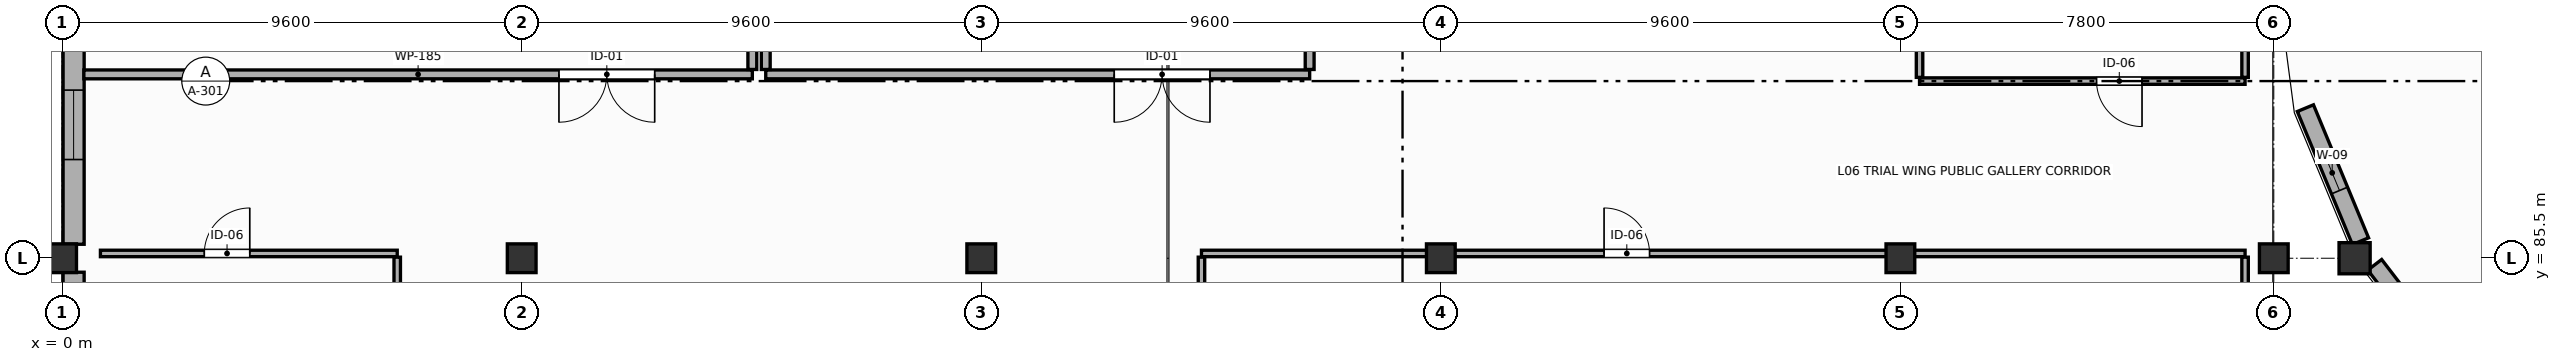
"""IFC4 building model, lengths in metres.
Left out: names, types, materials, properties, quantities, classifications, styles, units other than length and angle.
Written with IfcOpenShell. Run it as: python <this file> out.ifc"""

import sys

from ifc_helpers import new_model, si_unit, direction, frame, frame_2d, origin, origin_2d, place, context, subcontext, project, spatial, rectangle, circle, extrude, element, fill, save


model = new_model("IFC4")
c1 = context("Model", 3, precision=1e-05, world=origin(), true_north=direction((0.0, 1.0)))
c2 = subcontext(c1, "Body", "Model", "MODEL_VIEW")
j1 = project(units=[si_unit("LENGTHUNIT", "METRE"), si_unit("PLANEANGLEUNIT", "RADIAN")], contexts=[c1])
p1 = place(None, origin())
s1 = spatial("IfcSite", under=j1, at=p1, CompositionType="ELEMENT")
p2 = place(p1, origin())
s2 = spatial("IfcBuilding", under=s1, at=p2, CompositionType="ELEMENT")
p3 = place(p2, frame((0.0, 0.0, 22.8)))
s3 = spatial("IfcBuildingStorey", under=s2, at=p3, CompositionType="ELEMENT", Elevation=22.8)
p4 = place(p3, frame((47.888, 85.5, 0.0), z_axis=(0.0, 0.0, 1.0), x_axis=(1.0, 0.0, 0.0)))
e1 = element("IfcColumn", 1, at=p4, inside=s3, PredefinedType="COLUMN", context=c2, shape_type="SweptSolid", body=[
    extrude(circle(Radius=0.325, at=origin_2d()), origin(), (0.0, 0.0, 1.0), 4.2),
])
for number, where, z_axis, x_axis in (
    (2, (0.0, 85.5, 0.0), (0.0, 0.0, 1.0), (1.0, 0.0, 0.0)),
    (3, (9.6, 85.5, 0.0), (0.0, 0.0, 1.0), (1.0, 0.0, 0.0)),
    (4, (19.2, 85.5, 0.0), (0.0, 0.0, 1.0), (1.0, 0.0, 0.0)),
    (5, (28.8, 85.5, 0.0), (0.0, 0.0, 1.0), (1.0, 0.0, 0.0)),
    (6, (38.4, 85.5, 0.0), (0.0, 0.0, 1.0), (1.0, 0.0, 0.0)),
    (7, (46.2, 85.5, 0.0), (0.0, 0.0, 1.0), (1.0, 0.0, 0.0)),
):
    element("IfcColumn", number, at=place(p3, frame(where, z_axis=z_axis, x_axis=x_axis)), inside=s3, PredefinedType="COLUMN", context=c2, shape_type="SweptSolid", body=[
        extrude(rectangle(XDim=0.6, YDim=0.6, at=origin_2d()), origin(), (0.0, 0.0, 1.0), 4.2),
    ])
p5 = place(p3, frame((46.86, 88.635, 0.0), z_axis=(0.0, 0.0, 1.0), x_axis=(0.382700732442, -0.923872366395, 0.0)))
e8 = element("IfcWall", 8, at=p5, inside=s3, PredefinedType="ELEMENTEDWALL", context=c2, shape_type="SweptSolid", body=[
    extrude(rectangle(XDim=3.007, YDim=0.365, at=frame_2d((1.504, 0.0))), origin(), (0.0, 0.0, 1.0), 3.1),
])
p6 = place(p5, frame((1.062, 0.0, 0.85)))
e9 = element("IfcOpeningElement", 9, at=p6, cuts=e8, PredefinedType="OPENING", context=c2, shape_type="SweptSolid", body=[
    extrude(rectangle(XDim=0.8, YDim=1.7, at=frame_2d((0.4, 0.85))), frame((0.0, 0.192, 0.0), z_axis=(0.0, -1.0, 0.0), x_axis=(1.0, 0.0, 0.0)), (0.0, 0.0, 1.0), 0.385),
])
p7 = place(p3, frame((48.309, 85.363, 0.0), z_axis=(0.0, 0.0, 1.0), x_axis=(0.60876624393, -0.793349645649, 0.0)))
e10 = element("IfcWall", 10, at=p7, inside=s3, PredefinedType="ELEMENTEDWALL", context=c2, shape_type="SweptSolid", body=[
    extrude(rectangle(XDim=2.924, YDim=0.365, at=frame_2d((1.462, 0.0))), origin(), (0.0, 0.0, 1.0), 3.1),
])
p8 = place(p7, frame((1.062, 0.0, 0.85)))
e11 = element("IfcOpeningElement", 11, at=p8, cuts=e10, PredefinedType="OPENING", context=c2, shape_type="SweptSolid", body=[
    extrude(rectangle(XDim=0.8, YDim=1.7, at=frame_2d((0.4, 0.85))), frame((0.0, 0.192, 0.0), z_axis=(0.0, -1.0, 0.0), x_axis=(1.0, 0.0, 0.0)), (0.0, 0.0, 1.0), 0.385),
])
p9 = place(p3, frame((0.24, 74.692, 0.0), z_axis=(0.0, 0.0, 1.0), x_axis=(0.0, 1.0, 0.0)))
e12 = element("IfcWall", 12, at=p9, inside=s3, PredefinedType="STANDARD", context=c2, shape_type="SweptSolid", body=[
    extrude(rectangle(XDim=10.516, YDim=0.44, at=frame_2d((5.258, 0.0))), origin(), (0.0, 0.0, 1.0), 3.1),
])
p10 = place(p9, frame((1.52, 0.0, 0.85)))
e13 = element("IfcOpeningElement", 13, at=p10, cuts=e12, PredefinedType="OPENING", context=c2, shape_type="SweptSolid", body=[
    extrude(rectangle(XDim=1.45, YDim=2.05, at=frame_2d((0.725, 1.025))), frame((0.0, 0.23, 0.0), z_axis=(0.0, -1.0, 0.0), x_axis=(1.0, 0.0, 0.0)), (0.0, 0.0, 1.0), 0.46),
])
p11 = place(p9, frame((4.533, 0.0, 0.85)))
e14 = element("IfcOpeningElement", 14, at=p11, cuts=e12, PredefinedType="OPENING", context=c2, shape_type="SweptSolid", body=[
    extrude(rectangle(XDim=1.45, YDim=2.05, at=frame_2d((0.725, 1.025))), frame((0.0, 0.23, 0.0), z_axis=(0.0, -1.0, 0.0), x_axis=(1.0, 0.0, 0.0)), (0.0, 0.0, 1.0), 0.46),
])
p12 = place(p9, frame((7.546, 0.0, 0.85)))
e15 = element("IfcOpeningElement", 15, at=p12, cuts=e12, PredefinedType="OPENING", context=c2, shape_type="SweptSolid", body=[
    extrude(rectangle(XDim=1.45, YDim=2.05, at=frame_2d((0.725, 1.025))), frame((0.0, 0.23, 0.0), z_axis=(0.0, -1.0, 0.0), x_axis=(1.0, 0.0, 0.0)), (0.0, 0.0, 1.0), 0.46),
])
p13 = place(p3, frame((0.24, 85.792, 0.0), z_axis=(0.0, 0.0, 1.0), x_axis=(0.0, 1.0, 0.0)))
e16 = element("IfcWall", 16, at=p13, inside=s3, PredefinedType="STANDARD", context=c2, shape_type="SweptSolid", body=[
    extrude(rectangle(XDim=12.016, YDim=0.44, at=frame_2d((6.008, 0.0))), origin(), (0.0, 0.0, 1.0), 3.05),
])
p14 = place(p13, frame((1.77, 0.0, 0.78)))
e17 = element("IfcOpeningElement", 17, at=p14, cuts=e16, PredefinedType="OPENING", context=c2, shape_type="SweptSolid", body=[
    extrude(rectangle(XDim=1.45, YDim=2.05, at=frame_2d((0.725, 1.025))), frame((0.0, 0.23, 0.0), z_axis=(0.0, -1.0, 0.0), x_axis=(1.0, 0.0, 0.0)), (0.0, 0.0, 1.0), 0.46),
])
p15 = place(p13, frame((5.283, 0.0, 0.78)))
e18 = element("IfcOpeningElement", 18, at=p15, cuts=e16, PredefinedType="OPENING", context=c2, shape_type="SweptSolid", body=[
    extrude(rectangle(XDim=1.45, YDim=2.05, at=frame_2d((0.725, 1.025))), frame((0.0, 0.23, 0.0), z_axis=(0.0, -1.0, 0.0), x_axis=(1.0, 0.0, 0.0)), (0.0, 0.0, 1.0), 0.46),
])
p16 = place(p13, frame((8.796, 0.0, 0.78)))
e19 = element("IfcOpeningElement", 19, at=p16, cuts=e16, PredefinedType="OPENING", context=c2, shape_type="SweptSolid", body=[
    extrude(rectangle(XDim=1.45, YDim=2.05, at=frame_2d((0.725, 1.025))), frame((0.0, 0.23, 0.0), z_axis=(0.0, -1.0, 0.0), x_axis=(1.0, 0.0, 0.0)), (0.0, 0.0, 1.0), 0.46),
])
p17 = place(p3, frame((14.418, 89.34, 0.0), z_axis=(0.0, 0.0, 1.0), x_axis=(-1.0, 0.0, 0.0)))
e20 = element("IfcWall", 20, at=p17, inside=s3, PredefinedType="PARTITIONING", context=c2, shape_type="SweptSolid", body=[
    extrude(rectangle(XDim=13.964, YDim=0.185, at=frame_2d((6.982, 0.0))), origin(), (0.0, 0.0, 1.0), 3.1),
])
p18 = place(p17, frame((2.04, 0.0, 0.0)))
e21 = element("IfcOpeningElement", 21, at=p18, cuts=e20, PredefinedType="OPENING", context=c2, shape_type="SweptSolid", body=[
    extrude(rectangle(XDim=2.0, YDim=2.5, at=frame_2d((1.0, 1.25))), frame((0.0, 0.103, 0.0), z_axis=(0.0, -1.0, 0.0), x_axis=(1.0, 0.0, 0.0)), (0.0, 0.0, 1.0), 0.205),
])
p19 = place(p3, frame((14.418, 112.346, 0.0), z_axis=(0.0, 0.0, 1.0), x_axis=(0.0, -1.0, 0.0)))
e22 = element("IfcWall", 22, at=p19, inside=s3, PredefinedType="PARTITIONING", context=c2, shape_type="SweptSolid", body=[
    extrude(rectangle(XDim=22.904, YDim=0.185, at=frame_2d((11.452, 0.0))), origin(), (0.0, 0.0, 1.0), 3.3),
])
p20 = place(p3, frame((26.06, 89.34, 0.0), z_axis=(0.0, 0.0, 1.0), x_axis=(-1.0, 0.0, 0.0)))
e23 = element("IfcWall", 23, at=p20, inside=s3, PredefinedType="PARTITIONING", context=c2, shape_type="SweptSolid", body=[
    extrude(rectangle(XDim=11.362, YDim=0.185, at=frame_2d((5.681, 0.0))), origin(), (0.0, 0.0, 1.0), 3.1),
])
p21 = place(p20, frame((2.083, 0.0, 0.0)))
e24 = element("IfcOpeningElement", 24, at=p21, cuts=e23, PredefinedType="OPENING", context=c2, shape_type="SweptSolid", body=[
    extrude(rectangle(XDim=2.0, YDim=2.5, at=frame_2d((1.0, 1.25))), frame((0.0, 0.103, 0.0), z_axis=(0.0, -1.0, 0.0), x_axis=(1.0, 0.0, 0.0)), (0.0, 0.0, 1.0), 0.205),
])
for number, where, z_axis, x_axis in (
    (25, (14.698, 89.442, 0.0), (0.0, 0.0, 1.0), (0.0, 1.0, 0.0)),
    (26, (26.06, 97.597, 0.0), (0.0, 0.0, 1.0), (0.0, -1.0, 0.0)),
):
    element("IfcWall", number, at=place(p3, frame(where, z_axis=z_axis, x_axis=x_axis)), inside=s3, PredefinedType="PARTITIONING", context=c2, shape_type="SweptSolid", body=[
        extrude(rectangle(XDim=8.155, YDim=0.185, at=frame_2d((4.078, 0.0))), origin(), (0.0, 0.0, 1.0), 3.35),
    ])
p22 = place(p3, frame((45.6, 89.2, 0.0), z_axis=(0.0, 0.0, 1.0), x_axis=(-1.0, 0.0, 0.0)))
e27 = element("IfcWall", 27, at=p22, inside=s3, PredefinedType="PARTITIONING", context=c2, shape_type="SweptSolid", body=[
    extrude(rectangle(XDim=6.8, YDim=0.135, at=frame_2d((3.4, 0.0))), origin(), (0.0, 0.0, 1.0), 3.075),
])
p23 = place(p22, frame((2.153, 0.0, 0.0)))
e28 = element("IfcOpeningElement", 28, at=p23, cuts=e27, PredefinedType="OPENING", context=c2, shape_type="SweptSolid", body=[
    extrude(rectangle(XDim=0.95, YDim=2.15, at=frame_2d((0.475, 1.075))), frame((0.0, 0.077, 0.0), z_axis=(0.0, -1.0, 0.0), x_axis=(1.0, 0.0, 0.0)), (0.0, 0.0, 1.0), 0.155),
])
p24 = place(p3, frame((38.8, 89.278, 0.0), z_axis=(0.0, 0.0, 1.0), x_axis=(0.0, 1.0, 0.0)))
e29 = element("IfcWall", 29, at=p24, inside=s3, PredefinedType="PARTITIONING", context=c2, shape_type="SweptSolid", body=[
    extrude(rectangle(XDim=12.645, YDim=0.135, at=frame_2d((6.323, 0.0))), origin(), (0.0, 0.0, 1.0), 3.05),
])
p25 = place(p3, frame((45.6, 101.923, 0.0), z_axis=(0.0, 0.0, 1.0), x_axis=(0.0, -1.0, 0.0)))
e30 = element("IfcWall", 30, at=p25, inside=s3, PredefinedType="PARTITIONING", context=c2, shape_type="SweptSolid", body=[
    extrude(rectangle(XDim=12.645, YDim=0.135, at=frame_2d((6.323, 0.0))), origin(), (0.0, 0.0, 1.0), 3.325),
])
p26 = place(p3, frame((0.8, 85.6, 0.0), z_axis=(0.0, 0.0, 1.0), x_axis=(1.0, 0.0, 0.0)))
e31 = element("IfcWall", 31, at=p26, inside=s3, PredefinedType="PARTITIONING", context=c2, shape_type="SweptSolid", body=[
    extrude(rectangle(XDim=6.2, YDim=0.135, at=frame_2d((3.1, 0.0))), origin(), (0.0, 0.0, 1.0), 3.3),
])
p27 = place(p26, frame((2.17, 0.0, 0.0)))
e32 = element("IfcOpeningElement", 32, at=p27, cuts=e31, PredefinedType="OPENING", context=c2, shape_type="SweptSolid", body=[
    extrude(rectangle(XDim=0.95, YDim=2.15, at=frame_2d((0.475, 1.075))), frame((0.0, 0.077, 0.0), z_axis=(0.0, -1.0, 0.0), x_axis=(1.0, 0.0, 0.0)), (0.0, 0.0, 1.0), 0.155),
])
p28 = place(p3, frame((7.0, 85.522, 0.0), z_axis=(0.0, 0.0, 1.0), x_axis=(0.0, -1.0, 0.0)))
e33 = element("IfcWall", 33, at=p28, inside=s3, PredefinedType="PARTITIONING", context=c2, shape_type="SweptSolid", body=[
    extrude(rectangle(XDim=13.083, YDim=0.135, at=frame_2d((6.542, 0.0))), origin(), (0.0, 0.0, 1.0), 3.3),
])
p29 = place(p3, frame((23.8, 85.6, 0.0), z_axis=(0.0, 0.0, 1.0), x_axis=(1.0, 0.0, 0.0)))
e34 = element("IfcWall", 34, at=p29, inside=s3, PredefinedType="PARTITIONING", context=c2, shape_type="SweptSolid", body=[
    extrude(rectangle(XDim=21.8, YDim=0.135, at=frame_2d((10.9, 0.0))), origin(), (0.0, 0.0, 1.0), 3.075),
])
p30 = place(p29, frame((8.41, 0.0, 0.0)))
e35 = element("IfcOpeningElement", 35, at=p30, cuts=e34, PredefinedType="OPENING", context=c2, shape_type="SweptSolid", body=[
    extrude(rectangle(XDim=0.95, YDim=2.15, at=frame_2d((0.475, 1.075))), frame((0.0, 0.077, 0.0), z_axis=(0.0, -1.0, 0.0), x_axis=(1.0, 0.0, 0.0)), (0.0, 0.0, 1.0), 0.155),
])
p31 = place(p3, frame((23.8, 72.31, 0.0), z_axis=(0.0, 0.0, 1.0), x_axis=(0.0, 1.0, 0.0)))
e36 = element("IfcWall", 36, at=p31, inside=s3, PredefinedType="PARTITIONING", context=c2, shape_type="SweptSolid", body=[
    extrude(rectangle(XDim=13.212, YDim=0.135, at=frame_2d((6.606, 0.0))), origin(), (0.0, 0.0, 1.0), 3.3),
])
p32 = place(p3, frame((45.6, 85.522, 0.0), z_axis=(0.0, 0.0, 1.0), x_axis=(0.0, -1.0, 0.0)))
e37 = element("IfcWall", 37, at=p32, inside=s3, PredefinedType="PARTITIONING", context=c2, shape_type="SweptSolid", body=[
    extrude(rectangle(XDim=13.083, YDim=0.135, at=frame_2d((6.542, 0.0))), origin(), (0.0, 0.0, 1.0), 3.375),
])
p33 = place(p6, origin())
e38 = element("IfcWindow", 38, at=p33, inside=s3, PartitioningType="SINGLE_PANEL", PredefinedType="WINDOW", context=c2, shape_type="SweptSolid", body=[
    extrude(rectangle(XDim=0.8, YDim=1.7, at=frame_2d((0.4, 0.85))), frame((0.0, 0.03, 0.0), z_axis=(0.0, -1.0, 0.0), x_axis=(1.0, 0.0, 0.0)), (0.0, 0.0, 1.0), 0.06),
])
fill(e9, e38)
p34 = place(p14, origin())
e39 = element("IfcWindow", 39, at=p34, inside=s3, PartitioningType="SINGLE_PANEL", PredefinedType="WINDOW", context=c2, shape_type="SweptSolid", body=[
    extrude(rectangle(XDim=1.45, YDim=2.05, at=frame_2d((0.725, 1.025))), frame((0.0, 0.03, 0.0), z_axis=(0.0, -1.0, 0.0), x_axis=(1.0, 0.0, 0.0)), (0.0, 0.0, 1.0), 0.06),
])
fill(e17, e39)
p35 = place(p18, origin())
e40 = element("IfcDoor", 40, at=p35, inside=s3, OperationType="DOUBLE_DOOR_SINGLE_SWING", PredefinedType="DOOR", context=c2, shape_type="SweptSolid", body=[
    extrude(rectangle(XDim=2.0, YDim=2.5, at=frame_2d((1.0, 1.25))), frame((0.0, 0.025, 0.0), z_axis=(0.0, -1.0, 0.0), x_axis=(1.0, 0.0, 0.0)), (0.0, 0.0, 1.0), 0.05),
])
fill(e21, e40)
p36 = place(p21, origin())
e41 = element("IfcDoor", 41, at=p36, inside=s3, OperationType="DOUBLE_DOOR_SINGLE_SWING", PredefinedType="DOOR", context=c2, shape_type="SweptSolid", body=[
    extrude(rectangle(XDim=2.0, YDim=2.5, at=frame_2d((1.0, 1.25))), frame((0.0, 0.025, 0.0), z_axis=(0.0, -1.0, 0.0), x_axis=(1.0, 0.0, 0.0)), (0.0, 0.0, 1.0), 0.05),
])
fill(e24, e41)
p37 = place(p23, origin())
e42 = element("IfcDoor", 42, at=p37, inside=s3, OperationType="SINGLE_SWING_LEFT", PredefinedType="DOOR", context=c2, shape_type="SweptSolid", body=[
    extrude(rectangle(XDim=0.95, YDim=2.15, at=frame_2d((0.475, 1.075))), frame((0.0, 0.025, 0.0), z_axis=(0.0, -1.0, 0.0), x_axis=(1.0, 0.0, 0.0)), (0.0, 0.0, 1.0), 0.05),
])
fill(e28, e42)
p38 = place(p27, origin())
e43 = element("IfcDoor", 43, at=p38, inside=s3, OperationType="SINGLE_SWING_RIGHT", PredefinedType="DOOR", context=c2, shape_type="SweptSolid", body=[
    extrude(rectangle(XDim=0.95, YDim=2.15, at=frame_2d((0.475, 1.075))), frame((0.0, 0.025, 0.0), z_axis=(0.0, -1.0, 0.0), x_axis=(1.0, 0.0, 0.0)), (0.0, 0.0, 1.0), 0.05),
])
fill(e32, e43)
p39 = place(p30, origin())
e44 = element("IfcDoor", 44, at=p39, inside=s3, OperationType="SINGLE_SWING_LEFT", PredefinedType="DOOR", context=c2, shape_type="SweptSolid", body=[
    extrude(rectangle(XDim=0.95, YDim=2.15, at=frame_2d((0.475, 1.075))), frame((0.0, 0.025, 0.0), z_axis=(0.0, -1.0, 0.0), x_axis=(1.0, 0.0, 0.0)), (0.0, 0.0, 1.0), 0.05),
])
fill(e35, e44)
save(model, sys.argv[1])
